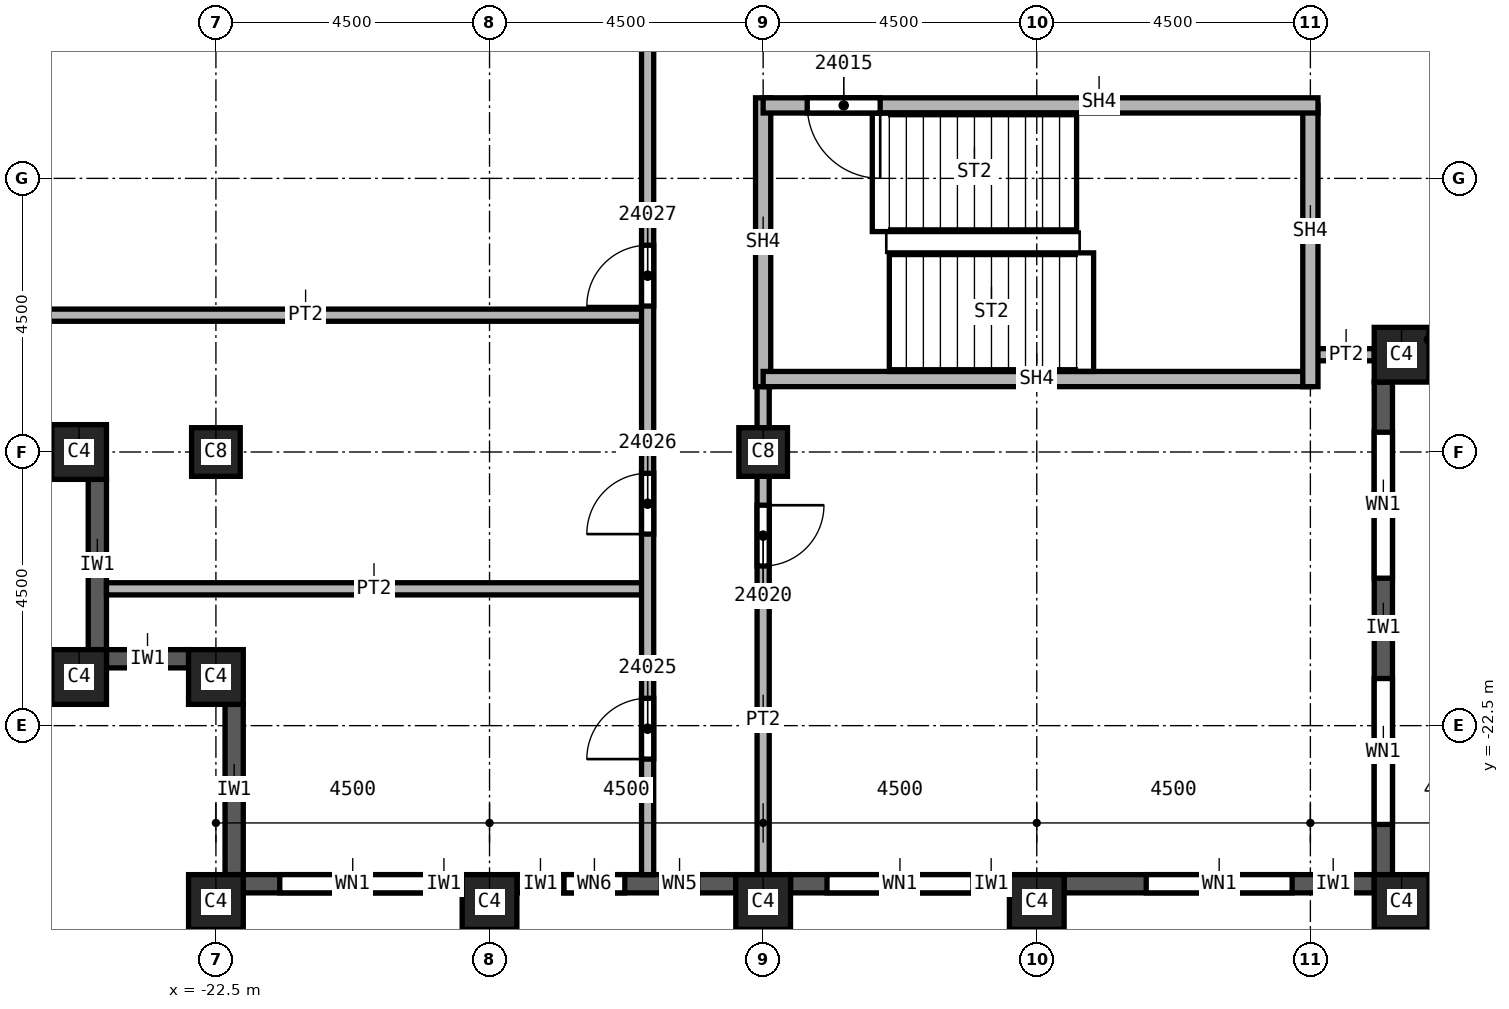
"""IFC4 building model, lengths in metres.
Left out: names, types, materials, properties, quantities, classifications, styles, units other than length and angle.
Written with IfcOpenShell. Run it as: python <this file> out.ifc"""

import sys

from ifc_helpers import new_model, si_unit, direction, frame, frame_2d, origin, origin_2d, place, context, subcontext, project, spatial, rectangle, extrude, element, fill, save


model = new_model("IFC4")
c1 = context("Model", 3, precision=1e-05, world=origin(), true_north=direction((0.0, 1.0)))
c2 = subcontext(c1, "Body", "Model", "MODEL_VIEW")
j1 = project(units=[si_unit("LENGTHUNIT", "METRE"), si_unit("PLANEANGLEUNIT", "RADIAN")], contexts=[c1])
p1 = place(None, origin())
s1 = spatial("IfcSite", under=j1, at=p1, CompositionType="ELEMENT")
p2 = place(p1, origin())
s2 = spatial("IfcBuilding", under=s1, at=p2, CompositionType="ELEMENT")
p3 = place(p2, frame((0.0, 0.0, 342.0)))
s3 = spatial("IfcBuildingStorey", under=s2, at=p3, CompositionType="ELEMENT", Elevation=342.0)
for number, where, z_axis, x_axis in (
    (1, (-13.5, -18.0, 0.0), (0.0, 0.0, 1.0), (1.0, 0.0, 0.0)),
    (2, (-22.5, -18.0, 0.0), (0.0, 0.0, 1.0), (1.0, 0.0, 0.0)),
):
    element("IfcColumn", number, at=place(p3, frame(where, z_axis=z_axis, x_axis=x_axis)), inside=s3, PredefinedType="COLUMN", context=c2, shape_type="SweptSolid", body=[
        extrude(rectangle(XDim=0.8, YDim=0.8, at=origin_2d()), origin(), (0.0, 0.0, 1.0), 3.74),
    ])
for number, where, z_axis, x_axis in (
    (3, (-3.0, -25.4, 0.0), (0.0, 0.0, 1.0), (1.0, 0.0, 0.0)),
    (4, (-9.0, -25.4, 0.0), (0.0, 0.0, 1.0), (1.0, 0.0, 0.0)),
    (5, (-13.5, -25.4, 0.0), (0.0, 0.0, 1.0), (1.0, 0.0, 0.0)),
    (6, (-18.0, -25.4, 0.0), (0.0, 0.0, 1.0), (1.0, 0.0, 0.0)),
    (7, (-22.5, -25.4, 0.0), (0.0, 0.0, 1.0), (1.0, 0.0, 0.0)),
    (8, (-3.0, -16.4, 0.0), (0.0, 0.0, 1.0), (1.0, 0.0, 0.0)),
    (9, (-22.5, -21.7, 0.0), (0.0, 0.0, 1.0), (1.0, 0.0, 0.0)),
    (10, (-24.75, -21.7, 0.0), (0.0, 0.0, 1.0), (1.0, 0.0, 0.0)),
    (11, (-24.75, -18.0, 0.0), (0.0, 0.0, 1.0), (1.0, 0.0, 0.0)),
):
    element("IfcColumn", number, at=place(p3, frame(where, z_axis=z_axis, x_axis=x_axis)), inside=s3, PredefinedType="COLUMN", context=c2, shape_type="SweptSolid", body=[
        extrude(rectangle(XDim=0.9, YDim=0.9, at=origin_2d()), origin(), (0.0, 0.0, 1.0), 3.74),
    ])
p4 = place(p3, frame((-24.45, -18.45, 0.0), z_axis=(0.0, 0.0, 1.0), x_axis=(0.0, -1.0, 0.0)))
e12 = element("IfcWall", 12, at=p4, inside=s3, PredefinedType="SOLIDWALL", context=c2, shape_type="SweptSolid", body=[
    extrude(rectangle(XDim=2.8, YDim=0.3, at=frame_2d((1.4, 0.0))), origin(), (0.0, 0.0, 1.0), 3.14),
])
p5 = place(p3, frame((-24.3, -21.4, 0.0), z_axis=(0.0, 0.0, 1.0), x_axis=(1.0, 0.0, 0.0)))
e13 = element("IfcWall", 13, at=p5, inside=s3, PredefinedType="SOLIDWALL", context=c2, shape_type="SweptSolid", body=[
    extrude(rectangle(XDim=1.35, YDim=0.3, at=frame_2d((0.675, 0.0))), origin(), (0.0, 0.0, 1.0), 3.14),
])
p6 = place(p3, frame((-22.2, -22.15, 0.0), z_axis=(0.0, 0.0, 1.0), x_axis=(0.0, -1.0, 0.0)))
e14 = element("IfcWall", 14, at=p6, inside=s3, PredefinedType="SOLIDWALL", context=c2, shape_type="SweptSolid", body=[
    extrude(rectangle(XDim=2.8, YDim=0.3, at=frame_2d((1.4, 0.0))), origin(), (0.0, 0.0, 1.0), 3.14),
])
p7 = place(p3, frame((-22.05, -25.1, 0.0), z_axis=(0.0, 0.0, 1.0), x_axis=(1.0, 0.0, 0.0)))
e15 = element("IfcWall", 15, at=p7, inside=s3, PredefinedType="SOLIDWALL", context=c2, shape_type="SweptSolid", body=[
    extrude(rectangle(XDim=3.6, YDim=0.3, at=frame_2d((1.8, 0.0))), origin(), (0.0, 0.0, 1.0), 3.14),
])
p8 = place(p7, frame((0.6, 0.0, 0.8)))
e16 = element("IfcOpeningElement", 16, at=p8, cuts=e15, PredefinedType="OPENING", context=c2, shape_type="SweptSolid", body=[
    extrude(rectangle(XDim=2.4, YDim=1.95, at=frame_2d((1.2, 0.975))), frame((0.0, 0.15, 0.0), z_axis=(0.0, -1.0, 0.0), x_axis=(1.0, 0.0, 0.0)), (0.0, 0.0, 1.0), 0.3),
])
p9 = place(p3, frame((-17.55, -25.1, 0.0), z_axis=(0.0, 0.0, 1.0), x_axis=(1.0, 0.0, 0.0)))
e17 = element("IfcWall", 17, at=p9, inside=s3, PredefinedType="SOLIDWALL", context=c2, shape_type="SweptSolid", body=[
    extrude(rectangle(XDim=3.6, YDim=0.3, at=frame_2d((1.8, 0.0))), origin(), (0.0, 0.0, 1.0), 3.14),
])
p10 = place(p9, frame((0.775, 0.0, 0.8)))
e18 = element("IfcOpeningElement", 18, at=p10, cuts=e17, PredefinedType="OPENING", context=c2, shape_type="SweptSolid", body=[
    extrude(rectangle(XDim=1.0, YDim=1.95, at=frame_2d((0.5, 0.975))), frame((0.0, 0.15, 0.0), z_axis=(0.0, -1.0, 0.0), x_axis=(1.0, 0.0, 0.0)), (0.0, 0.0, 1.0), 0.3),
])
p11 = place(p9, frame((2.375, 0.0, 0.8)))
e19 = element("IfcOpeningElement", 19, at=p11, cuts=e17, PredefinedType="OPENING", context=c2, shape_type="SweptSolid", body=[
    extrude(rectangle(XDim=0.6, YDim=1.95, at=frame_2d((0.3, 0.975))), frame((0.0, 0.15, 0.0), z_axis=(0.0, -1.0, 0.0), x_axis=(1.0, 0.0, 0.0)), (0.0, 0.0, 1.0), 0.3),
])
p12 = place(p3, frame((-13.05, -25.1, 0.0), z_axis=(0.0, 0.0, 1.0), x_axis=(1.0, 0.0, 0.0)))
e20 = element("IfcWall", 20, at=p12, inside=s3, PredefinedType="SOLIDWALL", context=c2, shape_type="SweptSolid", body=[
    extrude(rectangle(XDim=3.6, YDim=0.3, at=frame_2d((1.8, 0.0))), origin(), (0.0, 0.0, 1.0), 3.14),
])
p13 = place(p12, frame((0.6, 0.0, 0.8)))
e21 = element("IfcOpeningElement", 21, at=p13, cuts=e20, PredefinedType="OPENING", context=c2, shape_type="SweptSolid", body=[
    extrude(rectangle(XDim=2.4, YDim=1.95, at=frame_2d((1.2, 0.975))), frame((0.0, 0.15, 0.0), z_axis=(0.0, -1.0, 0.0), x_axis=(1.0, 0.0, 0.0)), (0.0, 0.0, 1.0), 0.3),
])
p14 = place(p3, frame((-8.55, -25.1, 0.0), z_axis=(0.0, 0.0, 1.0), x_axis=(1.0, 0.0, 0.0)))
e22 = element("IfcWall", 22, at=p14, inside=s3, PredefinedType="SOLIDWALL", context=c2, shape_type="SweptSolid", body=[
    extrude(rectangle(XDim=5.1, YDim=0.3, at=frame_2d((2.55, 0.0))), origin(), (0.0, 0.0, 1.0), 3.14),
])
p15 = place(p14, frame((1.35, 0.0, 0.8)))
e23 = element("IfcOpeningElement", 23, at=p15, cuts=e22, PredefinedType="OPENING", context=c2, shape_type="SweptSolid", body=[
    extrude(rectangle(XDim=2.4, YDim=1.95, at=frame_2d((1.2, 0.975))), frame((0.0, 0.15, 0.0), z_axis=(0.0, -1.0, 0.0), x_axis=(1.0, 0.0, 0.0)), (0.0, 0.0, 1.0), 0.3),
])
p16 = place(p3, frame((-3.3, -24.95, 0.0), z_axis=(0.0, 0.0, 1.0), x_axis=(0.0, 1.0, 0.0)))
e24 = element("IfcWall", 24, at=p16, inside=s3, PredefinedType="SOLIDWALL", context=c2, shape_type="SweptSolid", body=[
    extrude(rectangle(XDim=8.1, YDim=0.3, at=frame_2d((4.05, 0.0))), origin(), (0.0, 0.0, 1.0), 3.14),
])
p17 = place(p16, frame((0.825, 0.0, 0.8)))
e25 = element("IfcOpeningElement", 25, at=p17, cuts=e24, PredefinedType="OPENING", context=c2, shape_type="SweptSolid", body=[
    extrude(rectangle(XDim=2.4, YDim=1.95, at=frame_2d((1.2, 0.975))), frame((0.0, 0.15, 0.0), z_axis=(0.0, -1.0, 0.0), x_axis=(1.0, 0.0, 0.0)), (0.0, 0.0, 1.0), 0.3),
])
p18 = place(p16, frame((4.875, 0.0, 0.8)))
e26 = element("IfcOpeningElement", 26, at=p18, cuts=e24, PredefinedType="OPENING", context=c2, shape_type="SweptSolid", body=[
    extrude(rectangle(XDim=2.4, YDim=1.95, at=frame_2d((1.2, 0.975))), frame((0.0, 0.15, 0.0), z_axis=(0.0, -1.0, 0.0), x_axis=(1.0, 0.0, 0.0)), (0.0, 0.0, 1.0), 0.3),
])
p19 = place(p3, frame((-26.55, -15.75, 0.0), z_axis=(0.0, 0.0, 1.0), x_axis=(1.0, 0.0, 0.0)))
e27 = element("IfcWall", 27, at=p19, inside=s3, PredefinedType="PARTITIONING", context=c2, shape_type="SweptSolid", body=[
    extrude(rectangle(XDim=11.15, YDim=0.2, at=frame_2d((5.575, 0.0))), origin(), (0.0, 0.0, 1.0), 3.74),
])
p20 = place(p3, frame((-24.3, -20.25, 0.0), z_axis=(0.0, 0.0, 1.0), x_axis=(1.0, 0.0, 0.0)))
e28 = element("IfcWall", 28, at=p20, inside=s3, PredefinedType="PARTITIONING", context=c2, shape_type="SweptSolid", body=[
    extrude(rectangle(XDim=8.9, YDim=0.2, at=frame_2d((4.45, 0.0))), origin(), (0.0, 0.0, 1.0), 3.74),
])
p21 = place(p3, frame((-15.4, -24.95, 0.0), z_axis=(0.0, 0.0, 1.0), x_axis=(0.0, 1.0, 0.0)))
e29 = element("IfcWall", 29, at=p21, inside=s3, PredefinedType="PARTITIONING", context=c2, shape_type="SweptSolid", body=[
    extrude(rectangle(XDim=38.55, YDim=0.2, at=frame_2d((19.275, 0.0))), origin(), (0.0, 0.0, 1.0), 3.74),
])
p22 = place(p21, frame((30.5, 0.0, 0.0)))
e30 = element("IfcOpeningElement", 30, at=p22, cuts=e29, PredefinedType="OPENING", context=c2, shape_type="SweptSolid", body=[
    extrude(rectangle(XDim=1.0, YDim=2.1, at=frame_2d((0.5, 1.05))), frame((0.0, 0.1, 0.0), z_axis=(0.0, -1.0, 0.0), x_axis=(1.0, 0.0, 0.0)), (0.0, 0.0, 1.0), 0.2),
])
p23 = place(p21, frame((36.35, 0.0, 0.0)))
e31 = element("IfcOpeningElement", 31, at=p23, cuts=e29, PredefinedType="OPENING", context=c2, shape_type="SweptSolid", body=[
    extrude(rectangle(XDim=1.0, YDim=2.1, at=frame_2d((0.5, 1.05))), frame((0.0, 0.1, 0.0), z_axis=(0.0, -1.0, 0.0), x_axis=(1.0, 0.0, 0.0)), (0.0, 0.0, 1.0), 0.2),
])
p24 = place(p21, frame((1.9, 0.0, 0.0)))
e32 = element("IfcOpeningElement", 32, at=p24, cuts=e29, PredefinedType="OPENING", context=c2, shape_type="SweptSolid", body=[
    extrude(rectangle(XDim=1.0, YDim=2.1, at=frame_2d((0.5, 1.05))), frame((0.0, 0.1, 0.0), z_axis=(0.0, -1.0, 0.0), x_axis=(1.0, 0.0, 0.0)), (0.0, 0.0, 1.0), 0.2),
])
p25 = place(p21, frame((5.6, 0.0, 0.0)))
e33 = element("IfcOpeningElement", 33, at=p25, cuts=e29, PredefinedType="OPENING", context=c2, shape_type="SweptSolid", body=[
    extrude(rectangle(XDim=1.0, YDim=2.1, at=frame_2d((0.5, 1.05))), frame((0.0, 0.1, 0.0), z_axis=(0.0, -1.0, 0.0), x_axis=(1.0, 0.0, 0.0)), (0.0, 0.0, 1.0), 0.2),
])
p26 = place(p21, frame((9.35, 0.0, 0.0)))
e34 = element("IfcOpeningElement", 34, at=p26, cuts=e29, PredefinedType="OPENING", context=c2, shape_type="SweptSolid", body=[
    extrude(rectangle(XDim=1.0, YDim=2.1, at=frame_2d((0.5, 1.05))), frame((0.0, 0.1, 0.0), z_axis=(0.0, -1.0, 0.0), x_axis=(1.0, 0.0, 0.0)), (0.0, 0.0, 1.0), 0.2),
])
p27 = place(p21, frame((16.1, 0.0, 0.0)))
e35 = element("IfcOpeningElement", 35, at=p27, cuts=e29, PredefinedType="OPENING", context=c2, shape_type="SweptSolid", body=[
    extrude(rectangle(XDim=1.0, YDim=2.1, at=frame_2d((0.5, 1.05))), frame((0.0, 0.1, 0.0), z_axis=(0.0, -1.0, 0.0), x_axis=(1.0, 0.0, 0.0)), (0.0, 0.0, 1.0), 0.2),
])
p28 = place(p3, frame((-13.5, -16.675, 0.0), z_axis=(0.0, 0.0, 1.0), x_axis=(0.0, -1.0, 0.0)))
e36 = element("IfcWall", 36, at=p28, inside=s3, PredefinedType="PARTITIONING", context=c2, shape_type="SweptSolid", body=[
    extrude(rectangle(XDim=8.275, YDim=0.2, at=frame_2d((4.137, 0.0))), origin(), (0.0, 0.0, 1.0), 3.74),
])
p29 = place(p28, frame((2.2, 0.0, 0.0)))
e37 = element("IfcOpeningElement", 37, at=p29, cuts=e36, PredefinedType="OPENING", context=c2, shape_type="SweptSolid", body=[
    extrude(rectangle(XDim=1.0, YDim=2.1, at=frame_2d((0.5, 1.05))), frame((0.0, 0.1, 0.0), z_axis=(0.0, -1.0, 0.0), x_axis=(1.0, 0.0, 0.0)), (0.0, 0.0, 1.0), 0.2),
])
p30 = place(p3, frame((-3.45, -16.4, 0.0), z_axis=(0.0, 0.0, 1.0), x_axis=(-1.0, 0.0, 0.0)))
e38 = element("IfcWall", 38, at=p30, inside=s3, PredefinedType="PARTITIONING", context=c2, shape_type="SweptSolid", body=[
    extrude(rectangle(XDim=1.05, YDim=0.2, at=frame_2d((0.525, 0.0))), origin(), (0.0, 0.0, 1.0), 3.74),
])
p31 = place(p3, frame((-13.5, -12.175, 0.0), z_axis=(0.0, 0.0, 1.0), x_axis=(0.0, -1.0, 0.0)))
e39 = element("IfcWall", 39, at=p31, inside=s3, PredefinedType="SOLIDWALL", context=c2, shape_type="SweptSolid", body=[
    extrude(rectangle(XDim=4.75, YDim=0.25, at=frame_2d((2.375, 0.0))), origin(), (0.0, 0.0, 1.0), 3.74),
])
p32 = place(p3, frame((-4.5, -16.8, 0.0), z_axis=(0.0, 0.0, 1.0), x_axis=(-1.0, 0.0, 0.0)))
e40 = element("IfcWall", 40, at=p32, inside=s3, PredefinedType="SOLIDWALL", context=c2, shape_type="SweptSolid", body=[
    extrude(rectangle(XDim=9.0, YDim=0.25, at=frame_2d((4.5, 0.0))), origin(), (0.0, 0.0, 1.0), 3.74),
])
p33 = place(p3, frame((-4.5, -12.3, 0.0), z_axis=(0.0, 0.0, 1.0), x_axis=(0.0, -1.0, 0.0)))
e41 = element("IfcWall", 41, at=p33, inside=s3, PredefinedType="SOLIDWALL", context=c2, shape_type="SweptSolid", body=[
    extrude(rectangle(XDim=4.625, YDim=0.25, at=frame_2d((2.312, 0.0))), origin(), (0.0, 0.0, 1.0), 3.74),
])
p34 = place(p3, frame((-4.375, -12.3, 0.0), z_axis=(0.0, 0.0, 1.0), x_axis=(-1.0, 0.0, 0.0)))
e42 = element("IfcWall", 42, at=p34, inside=s3, PredefinedType="SOLIDWALL", context=c2, shape_type="SweptSolid", body=[
    extrude(rectangle(XDim=9.125, YDim=0.25, at=frame_2d((4.562, 0.0))), origin(), (0.0, 0.0, 1.0), 3.74),
])
p35 = place(p34, frame((7.2, 0.0, 0.0)))
e43 = element("IfcOpeningElement", 43, at=p35, cuts=e42, PredefinedType="OPENING", context=c2, shape_type="SweptSolid", body=[
    extrude(rectangle(XDim=1.2, YDim=2.1, at=frame_2d((0.6, 1.05))), frame((0.0, 0.125, 0.0), z_axis=(0.0, -1.0, 0.0), x_axis=(1.0, 0.0, 0.0)), (0.0, 0.0, 1.0), 0.25),
])
p36 = place(p8, origin())
e44 = element("IfcWindow", 44, at=p36, inside=s3, PartitioningType="SINGLE_PANEL", PredefinedType="WINDOW", context=c2, shape_type="SweptSolid", body=[
    extrude(rectangle(XDim=2.4, YDim=1.95, at=frame_2d((1.2, 0.975))), frame((0.0, 0.03, 0.0), z_axis=(0.0, -1.0, 0.0), x_axis=(1.0, 0.0, 0.0)), (0.0, 0.0, 1.0), 0.06),
])
fill(e16, e44)
p37 = place(p13, origin())
e45 = element("IfcWindow", 45, at=p37, inside=s3, PartitioningType="SINGLE_PANEL", PredefinedType="WINDOW", context=c2, shape_type="SweptSolid", body=[
    extrude(rectangle(XDim=2.4, YDim=1.95, at=frame_2d((1.2, 0.975))), frame((0.0, 0.03, 0.0), z_axis=(0.0, -1.0, 0.0), x_axis=(1.0, 0.0, 0.0)), (0.0, 0.0, 1.0), 0.06),
])
fill(e21, e45)
p38 = place(p15, origin())
e46 = element("IfcWindow", 46, at=p38, inside=s3, PartitioningType="SINGLE_PANEL", PredefinedType="WINDOW", context=c2, shape_type="SweptSolid", body=[
    extrude(rectangle(XDim=2.4, YDim=1.95, at=frame_2d((1.2, 0.975))), frame((0.0, 0.03, 0.0), z_axis=(0.0, -1.0, 0.0), x_axis=(1.0, 0.0, 0.0)), (0.0, 0.0, 1.0), 0.06),
])
fill(e23, e46)
p39 = place(p17, origin())
e47 = element("IfcWindow", 47, at=p39, inside=s3, PartitioningType="SINGLE_PANEL", PredefinedType="WINDOW", context=c2, shape_type="SweptSolid", body=[
    extrude(rectangle(XDim=2.4, YDim=1.95, at=frame_2d((1.2, 0.975))), frame((0.0, 0.03, 0.0), z_axis=(0.0, -1.0, 0.0), x_axis=(1.0, 0.0, 0.0)), (0.0, 0.0, 1.0), 0.06),
])
fill(e25, e47)
p40 = place(p18, origin())
e48 = element("IfcWindow", 48, at=p40, inside=s3, PartitioningType="SINGLE_PANEL", PredefinedType="WINDOW", context=c2, shape_type="SweptSolid", body=[
    extrude(rectangle(XDim=2.4, YDim=1.95, at=frame_2d((1.2, 0.975))), frame((0.0, 0.03, 0.0), z_axis=(0.0, -1.0, 0.0), x_axis=(1.0, 0.0, 0.0)), (0.0, 0.0, 1.0), 0.06),
])
fill(e26, e48)
p41 = place(p35, origin())
e49 = element("IfcDoor", 49, at=p41, inside=s3, OperationType="SINGLE_SWING_RIGHT", PredefinedType="DOOR", context=c2, shape_type="SweptSolid", body=[
    extrude(rectangle(XDim=1.2, YDim=2.1, at=frame_2d((0.6, 1.05))), frame((0.0, 0.025, 0.0), z_axis=(0.0, -1.0, 0.0), x_axis=(1.0, 0.0, 0.0)), (0.0, 0.0, 1.0), 0.05),
])
fill(e43, e49)
p42 = place(p29, origin())
e50 = element("IfcDoor", 50, at=p42, inside=s3, OperationType="SINGLE_SWING_LEFT", PredefinedType="DOOR", context=c2, shape_type="SweptSolid", body=[
    extrude(rectangle(XDim=1.0, YDim=2.1, at=frame_2d((0.5, 1.05))), frame((0.0, 0.025, 0.0), z_axis=(0.0, -1.0, 0.0), x_axis=(1.0, 0.0, 0.0)), (0.0, 0.0, 1.0), 0.05),
])
fill(e37, e50)
p43 = place(p24, origin())
e51 = element("IfcDoor", 51, at=p43, inside=s3, OperationType="SINGLE_SWING_RIGHT", PredefinedType="DOOR", context=c2, shape_type="SweptSolid", body=[
    extrude(rectangle(XDim=1.0, YDim=2.1, at=frame_2d((0.5, 1.05))), frame((0.0, 0.025, 0.0), z_axis=(0.0, -1.0, 0.0), x_axis=(1.0, 0.0, 0.0)), (0.0, 0.0, 1.0), 0.05),
])
fill(e32, e51)
p44 = place(p25, origin())
e52 = element("IfcDoor", 52, at=p44, inside=s3, OperationType="SINGLE_SWING_LEFT", PredefinedType="DOOR", context=c2, shape_type="SweptSolid", body=[
    extrude(rectangle(XDim=1.0, YDim=2.1, at=frame_2d((0.5, 1.05))), frame((0.0, 0.025, 0.0), z_axis=(0.0, -1.0, 0.0), x_axis=(1.0, 0.0, 0.0)), (0.0, 0.0, 1.0), 0.05),
])
fill(e33, e52)
p45 = place(p26, origin())
e53 = element("IfcDoor", 53, at=p45, inside=s3, OperationType="SINGLE_SWING_RIGHT", PredefinedType="DOOR", context=c2, shape_type="SweptSolid", body=[
    extrude(rectangle(XDim=1.0, YDim=2.1, at=frame_2d((0.5, 1.05))), frame((0.0, 0.025, 0.0), z_axis=(0.0, -1.0, 0.0), x_axis=(1.0, 0.0, 0.0)), (0.0, 0.0, 1.0), 0.05),
])
fill(e34, e53)
p46 = place(p10, origin())
e54 = element("IfcWindow", 54, at=p46, inside=s3, PartitioningType="SINGLE_PANEL", PredefinedType="WINDOW", context=c2, shape_type="SweptSolid", body=[
    extrude(rectangle(XDim=1.0, YDim=1.95, at=frame_2d((0.5, 0.975))), frame((0.0, 0.03, 0.0), z_axis=(0.0, -1.0, 0.0), x_axis=(1.0, 0.0, 0.0)), (0.0, 0.0, 1.0), 0.06),
])
fill(e18, e54)
p47 = place(p11, origin())
e55 = element("IfcWindow", 55, at=p47, inside=s3, PartitioningType="SINGLE_PANEL", PredefinedType="WINDOW", context=c2, shape_type="SweptSolid", body=[
    extrude(rectangle(XDim=0.6, YDim=1.95, at=frame_2d((0.3, 0.975))), frame((0.0, 0.03, 0.0), z_axis=(0.0, -1.0, 0.0), x_axis=(1.0, 0.0, 0.0)), (0.0, 0.0, 1.0), 0.06),
])
fill(e19, e55)
save(model, sys.argv[1])
